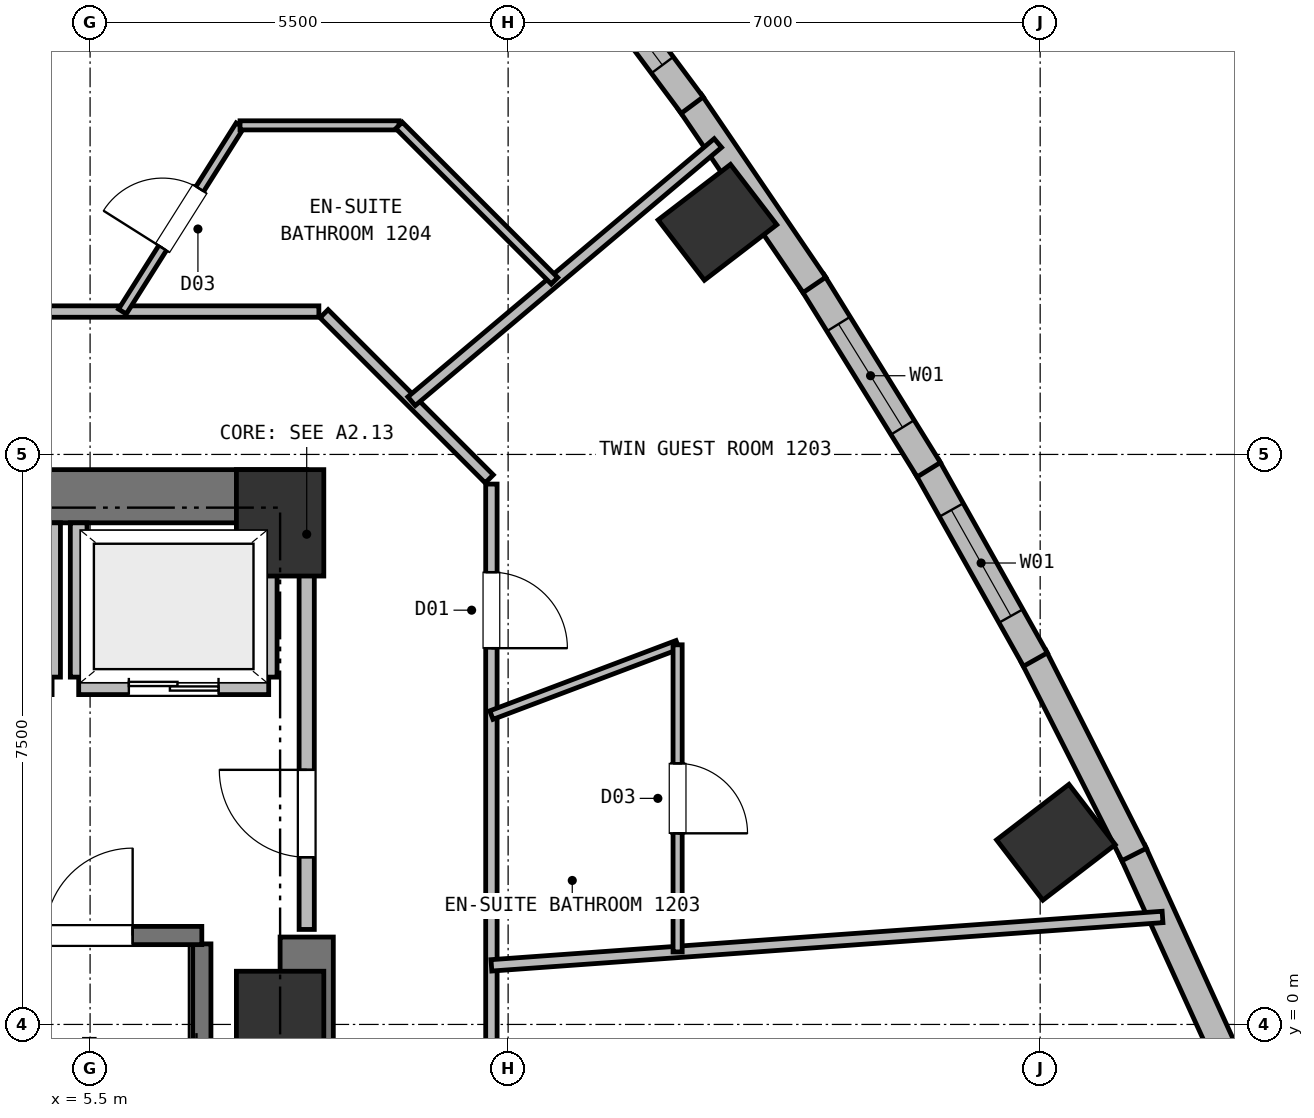
"""IFC4 building model, lengths in metres.
Left out: names, types, materials, properties, quantities, classifications, styles, units other than length and angle.
Written with IfcOpenShell. Run it as: python <this file> out.ifc"""

import sys

from ifc_helpers import new_model, si_unit, direction, frame, frame_2d, origin, origin_2d, place, context, subcontext, project, spatial, rectangle, extrude, element, fill, save


model = new_model("IFC4")
c1 = context("Model", 3, precision=1e-05, world=origin(), true_north=direction((0.0, 1.0)))
c2 = subcontext(c1, "Body", "Model", "MODEL_VIEW")
j1 = project(units=[si_unit("LENGTHUNIT", "METRE"), si_unit("PLANEANGLEUNIT", "RADIAN")], contexts=[c1])
p1 = place(None, origin())
s1 = spatial("IfcSite", under=j1, at=p1, CompositionType="ELEMENT")
p2 = place(p1, origin())
s2 = spatial("IfcBuilding", under=s1, at=p2, CompositionType="ELEMENT")
p3 = place(p2, frame((0.0, 0.0, 41.75)))
s3 = spatial("IfcBuildingStorey", under=s2, at=p3, CompositionType="ELEMENT", Elevation=41.75)
for number, where, z_axis, x_axis in (
    (1, (8.0, 0.0, 0.0), (0.0, 0.0, 1.0), (1.0, 0.0, 0.0)),
    (2, (8.0, 6.6, 0.0), (0.0, 0.0, 1.0), (1.0, 0.0, 0.0)),
):
    element("IfcColumn", number, at=place(p3, frame(where, z_axis=z_axis, x_axis=x_axis)), inside=s3, PredefinedType="COLUMN", context=c2, shape_type="SweptSolid", body=[
        extrude(rectangle(XDim=1.15, YDim=1.4, at=origin_2d()), origin(), (0.0, 0.0, 1.0), 3.75),
    ])
p4 = place(p3, frame((-8.35, 6.95, 0.0), z_axis=(0.0, 0.0, 1.0), x_axis=(1.0, 0.0, 0.0)))
e3 = element("IfcWall", 3, at=p4, inside=s3, PredefinedType="SHEAR", context=c2, shape_type="SweptSolid", body=[
    extrude(rectangle(XDim=16.7, YDim=0.7, at=frame_2d((8.35, 0.0))), origin(), (0.0, 0.0, 1.0), 3.5),
])
p5 = place(p3, frame((8.35, -6.95, 0.0), z_axis=(0.0, 0.0, 1.0), x_axis=(0.0, 1.0, 0.0)))
e4 = element("IfcWall", 4, at=p5, inside=s3, PredefinedType="SHEAR", context=c2, shape_type="SweptSolid", body=[
    extrude(rectangle(XDim=8.1, YDim=0.7, at=frame_2d((4.05, 0.0))), origin(), (0.0, 0.0, 1.0), 3.5),
])
for number, where, z_axis, x_axis in (
    (5, (18.207, 2.397, 0.0), (0.0, 0.0, 1.0), (-0.609, 0.793, 0.0)),
    (6, (13.754, 10.554, 0.0), (0.0, 0.0, 1.0), (-0.609, 0.793, 0.0)),
):
    element("IfcColumn", number, at=place(p3, frame(where, z_axis=z_axis, x_axis=x_axis)), inside=s3, PredefinedType="COLUMN", context=c2, shape_type="SweptSolid", body=[
        extrude(rectangle(XDim=1.0, YDim=1.2, at=origin_2d()), origin(), (0.0, 0.0, 1.0), 3.75),
    ])
p6 = place(p3, frame((19.215, 2.281, 0.0), z_axis=(0.0, 0.0, 1.0), x_axis=(0.414578361646, -0.910013616412, 0.0)))
e7 = element("IfcWall", 7, at=p6, inside=s3, PredefinedType="SOLIDWALL", context=c2, shape_type="SweptSolid", body=[
    extrude(rectangle(XDim=2.941, YDim=0.36, at=frame_2d((1.47, 0.0))), origin(), (0.0, 0.0, 1.0), 3.5),
])
p7 = place(p3, frame((17.914, 4.845, 0.0), z_axis=(0.0, 0.0, 1.0), x_axis=(0.452380947907, -0.891824802285, 0.0)))
e8 = element("IfcWall", 8, at=p7, inside=s3, PredefinedType="SOLIDWALL", context=c2, shape_type="SweptSolid", body=[
    extrude(rectangle(XDim=2.925, YDim=0.36, at=frame_2d((1.462, 0.0))), origin(), (0.0, 0.0, 1.0), 3.5),
])
p8 = place(p3, frame((16.509, 7.342, 0.0), z_axis=(0.0, 0.0, 1.0), x_axis=(0.489847587765, -0.871808087116, 0.0)))
e9 = element("IfcWall", 9, at=p8, inside=s3, PredefinedType="SOLIDWALL", context=c2, shape_type="SweptSolid", body=[
    extrude(rectangle(XDim=2.915, YDim=0.36, at=frame_2d((1.457, 0.0))), origin(), (0.0, 0.0, 1.0), 3.5),
])
p9 = place(p8, frame((0.657, 0.0, 0.72)))
e10 = element("IfcOpeningElement", 10, at=p9, cuts=e9, PredefinedType="OPENING", context=c2, shape_type="SweptSolid", body=[
    extrude(rectangle(XDim=1.6, YDim=1.88, at=frame_2d((0.8, 0.94))), frame((0.0, 0.19, 0.0), z_axis=(0.0, -1.0, 0.0), x_axis=(1.0, 0.0, 0.0)), (0.0, 0.0, 1.0), 0.38),
])
p10 = place(p3, frame((15.002, 9.772, 0.0), z_axis=(0.0, 0.0, 1.0), x_axis=(0.526646311391, -0.850084503269, 0.0)))
e11 = element("IfcWall", 11, at=p10, inside=s3, PredefinedType="SOLIDWALL", context=c2, shape_type="SweptSolid", body=[
    extrude(rectangle(XDim=2.91, YDim=0.36, at=frame_2d((1.455, 0.0))), origin(), (0.0, 0.0, 1.0), 3.5),
])
p11 = place(p10, frame((0.655, 0.0, 0.72)))
e12 = element("IfcOpeningElement", 12, at=p11, cuts=e11, PredefinedType="OPENING", context=c2, shape_type="SweptSolid", body=[
    extrude(rectangle(XDim=1.6, YDim=1.88, at=frame_2d((0.8, 0.94))), frame((0.0, 0.19, 0.0), z_axis=(0.0, -1.0, 0.0), x_axis=(1.0, 0.0, 0.0)), (0.0, 0.0, 1.0), 0.38),
])
p12 = place(p3, frame((13.393, 12.136, 0.0), z_axis=(0.0, 0.0, 1.0), x_axis=(0.562401815537, -0.82686407461, 0.0)))
e13 = element("IfcWall", 13, at=p12, inside=s3, PredefinedType="SOLIDWALL", context=c2, shape_type="SweptSolid", body=[
    extrude(rectangle(XDim=2.91, YDim=0.36, at=frame_2d((1.455, 0.0))), origin(), (0.0, 0.0, 1.0), 3.5),
])
p13 = place(p3, frame((11.681, 14.434, 0.0), z_axis=(0.0, 0.0, 1.0), x_axis=(0.597208824727, -0.802085793209, 0.0)))
e14 = element("IfcWall", 14, at=p13, inside=s3, PredefinedType="SOLIDWALL", context=c2, shape_type="SweptSolid", body=[
    extrude(rectangle(XDim=2.915, YDim=0.36, at=frame_2d((1.458, 0.0))), origin(), (0.0, 0.0, 1.0), 3.5),
])
p14 = place(p13, frame((0.657, 0.0, 0.72)))
e15 = element("IfcOpeningElement", 15, at=p14, cuts=e14, PredefinedType="OPENING", context=c2, shape_type="SweptSolid", body=[
    extrude(rectangle(XDim=1.6, YDim=1.88, at=frame_2d((0.8, 0.94))), frame((0.0, 0.19, 0.0), z_axis=(0.0, -1.0, 0.0), x_axis=(1.0, 0.0, 0.0)), (0.0, 0.0, 1.0), 0.38),
])
p15 = place(p3, frame((6.97, -6.16, 0.0), z_axis=(0.0, 0.0, 1.0), x_axis=(0.0, 1.0, 0.0)))
e16 = element("IfcWall", 16, at=p15, inside=s3, PredefinedType="SHEAR", context=c2, shape_type="SweptSolid", body=[
    extrude(rectangle(XDim=7.22, YDim=0.24, at=frame_2d((3.61, 0.0))), origin(), (0.0, 0.0, 1.0), 3.5),
])
p16 = place(p3, frame((4.01, 1.17, 0.0), z_axis=(0.0, 0.0, 1.0), x_axis=(1.0, 0.0, 0.0)))
e17 = element("IfcWall", 17, at=p16, inside=s3, PredefinedType="SHEAR", context=c2, shape_type="SweptSolid", body=[
    extrude(rectangle(XDim=2.96, YDim=0.24, at=frame_2d((1.48, 0.0))), origin(), (0.0, 0.0, 1.0), 3.5),
])
p17 = place(p16, frame((0.9, 0.0, 0.0)))
e18 = element("IfcOpeningElement", 18, at=p17, cuts=e17, PredefinedType="OPENING", context=c2, shape_type="SweptSolid", body=[
    extrude(rectangle(XDim=1.15, YDim=2.15, at=frame_2d((0.575, 1.075))), frame((0.0, 0.13, 0.0), z_axis=(0.0, -1.0, 0.0), x_axis=(1.0, 0.0, 0.0)), (0.0, 0.0, 1.0), 0.26),
])
p18 = place(p3, frame((5.35, 4.45, 0.0), z_axis=(0.0, 0.0, 1.0), x_axis=(1.0, 0.0, 0.0)))
e19 = element("IfcWall", 19, at=p18, inside=s3, PredefinedType="PARTITIONING", context=c2, shape_type="SweptSolid", body=[
    extrude(rectangle(XDim=2.5, YDim=0.22, at=frame_2d((1.25, 0.0))), origin(), (0.0, 0.0, 1.0), 3.5),
])
p19 = place(p18, frame((0.66, 0.0, 0.0)))
e20 = element("IfcOpeningElement", 20, at=p19, cuts=e19, PredefinedType="OPENING", context=c2, shape_type="SweptSolid", body=[
    extrude(rectangle(XDim=1.18, YDim=2.15, at=frame_2d((0.59, 1.075))), frame((0.0, 0.12, 0.0), z_axis=(0.0, -1.0, 0.0), x_axis=(1.0, 0.0, 0.0)), (0.0, 0.0, 1.0), 0.24),
])
p20 = place(p3, frame((5.35, 4.57, 0.0), z_axis=(0.0, 0.0, 1.0), x_axis=(0.0, 1.0, 0.0)))
e21 = element("IfcWall", 21, at=p20, inside=s3, PredefinedType="PARTITIONING", context=c2, shape_type="SweptSolid", body=[
    extrude(rectangle(XDim=2.03, YDim=0.22, at=frame_2d((1.015, 0.0))), origin(), (0.0, 0.0, 1.0), 3.5),
])
p21 = place(p3, frame((7.85, 4.57, 0.0), z_axis=(0.0, 0.0, 1.0), x_axis=(0.0, 1.0, 0.0)))
e22 = element("IfcWall", 22, at=p21, inside=s3, PredefinedType="PARTITIONING", context=c2, shape_type="SweptSolid", body=[
    extrude(rectangle(XDim=2.03, YDim=0.22, at=frame_2d((1.015, 0.0))), origin(), (0.0, 0.0, 1.0), 3.08),
])
p22 = place(p3, frame((2.6, 4.45, 0.0), z_axis=(0.0, 0.0, 1.0), x_axis=(1.0, 0.0, 0.0)))
e23 = element("IfcWall", 23, at=p22, inside=s3, PredefinedType="PARTITIONING", context=c2, shape_type="SweptSolid", body=[
    extrude(rectangle(XDim=2.4, YDim=0.22, at=frame_2d((1.2, 0.0))), origin(), (0.0, 0.0, 1.0), 3.5),
])
p23 = place(p22, frame((0.9, 0.0, 0.0)))
e24 = element("IfcOpeningElement", 24, at=p23, cuts=e23, PredefinedType="OPENING", context=c2, shape_type="SweptSolid", body=[
    extrude(rectangle(XDim=1.22, YDim=2.15, at=frame_2d((0.61, 1.075))), frame((0.0, 0.12, 0.0), z_axis=(0.0, -1.0, 0.0), x_axis=(1.0, 0.0, 0.0)), (0.0, 0.0, 1.0), 0.24),
])
p24 = place(p3, frame((5.0, 4.57, 0.0), z_axis=(0.0, 0.0, 1.0), x_axis=(0.0, 1.0, 0.0)))
e25 = element("IfcWall", 25, at=p24, inside=s3, PredefinedType="PARTITIONING", context=c2, shape_type="SweptSolid", body=[
    extrude(rectangle(XDim=2.03, YDim=0.22, at=frame_2d((1.015, 0.0))), origin(), (0.0, 0.0, 1.0), 3.5),
])
p25 = place(p3, frame((8.35, 1.25, 0.0), z_axis=(0.0, 0.0, 1.0), x_axis=(0.0, 1.0, 0.0)))
e26 = element("IfcWall", 26, at=p25, inside=s3, PredefinedType="PARTITIONING", context=c2, shape_type="SweptSolid", body=[
    extrude(rectangle(XDim=5.3, YDim=0.2, at=frame_2d((2.65, 0.0))), origin(), (0.0, 0.0, 1.0), 3.5),
])
p26 = place(p25, frame((0.95, 0.0, 0.0)))
e27 = element("IfcOpeningElement", 27, at=p26, cuts=e26, PredefinedType="OPENING", context=c2, shape_type="SweptSolid", body=[
    extrude(rectangle(XDim=1.15, YDim=2.15, at=frame_2d((0.575, 1.075))), frame((0.0, 0.11, 0.0), z_axis=(0.0, -1.0, 0.0), x_axis=(1.0, 0.0, 0.0)), (0.0, 0.0, 1.0), 0.22),
])
p27 = place(p3, frame((10.78, 7.11, 0.0), z_axis=(0.0, 0.0, 1.0), x_axis=(0.0, -1.0, 0.0)))
e28 = element("IfcWall", 28, at=p27, inside=s3, PredefinedType="PARTITIONING", context=c2, shape_type="SweptSolid", body=[
    extrude(rectangle(XDim=14.22, YDim=0.15, at=frame_2d((7.11, 0.0))), origin(), (0.0, 0.0, 1.0), 3.12),
])
p28 = place(p27, frame((1.159, 0.0, 0.0)))
e29 = element("IfcOpeningElement", 29, at=p28, cuts=e28, PredefinedType="OPENING", context=c2, shape_type="SweptSolid", body=[
    extrude(rectangle(XDim=1.0, YDim=2.15, at=frame_2d((0.5, 1.075))), frame((0.0, 0.085, 0.0), z_axis=(0.0, -1.0, 0.0), x_axis=(1.0, 0.0, 0.0)), (0.0, 0.0, 1.0), 0.17),
])
p29 = place(p27, frame((9.046, 0.0, 0.0)))
e30 = element("IfcOpeningElement", 30, at=p29, cuts=e28, PredefinedType="OPENING", context=c2, shape_type="SweptSolid", body=[
    extrude(rectangle(XDim=1.0, YDim=2.15, at=frame_2d((0.5, 1.075))), frame((0.0, 0.085, 0.0), z_axis=(0.0, -1.0, 0.0), x_axis=(1.0, 0.0, 0.0)), (0.0, 0.0, 1.0), 0.17),
])
p30 = place(p3, frame((8.578, 9.352, 0.0), z_axis=(0.0, 0.0, 1.0), x_axis=(0.707067066127, -0.707146494016, 0.0)))
e31 = element("IfcWall", 31, at=p30, inside=s3, PredefinedType="PARTITIONING", context=c2, shape_type="SweptSolid", body=[
    extrude(rectangle(XDim=3.074, YDim=0.15, at=frame_2d((1.537, 0.0))), origin(), (0.0, 0.0, 1.0), 3.5),
])
p31 = place(p3, frame((-8.51, 9.38, 0.0), z_axis=(0.0, 0.0, 1.0), x_axis=(1.0, 0.0, 0.0)))
e32 = element("IfcWall", 32, at=p31, inside=s3, PredefinedType="PARTITIONING", context=c2, shape_type="SweptSolid", body=[
    extrude(rectangle(XDim=17.02, YDim=0.15, at=frame_2d((8.51, 0.0))), origin(), (0.0, 0.0, 1.0), 3.5),
])
p32 = place(p31, frame((11.971, 0.0, 0.0)))
e33 = element("IfcOpeningElement", 33, at=p32, cuts=e32, PredefinedType="OPENING", context=c2, shape_type="SweptSolid", body=[
    extrude(rectangle(XDim=1.06, YDim=2.15, at=frame_2d((0.53, 1.075))), frame((0.0, 0.085, 0.0), z_axis=(0.0, -1.0, 0.0), x_axis=(1.0, 0.0, 0.0)), (0.0, 0.0, 1.0), 0.17),
])
p33 = place(p31, frame((5.492, 0.0, 0.0)))
e34 = element("IfcOpeningElement", 34, at=p33, cuts=e32, PredefinedType="OPENING", context=c2, shape_type="SweptSolid", body=[
    extrude(rectangle(XDim=1.06, YDim=2.15, at=frame_2d((0.53, 1.075))), frame((0.0, 0.085, 0.0), z_axis=(0.0, -1.0, 0.0), x_axis=(1.0, 0.0, 0.0)), (0.0, 0.0, 1.0), 0.17),
])
p34 = place(p3, frame((10.78, 0.777, 0.0), z_axis=(0.0, 0.0, 1.0), x_axis=(0.997408338359, 0.071948638431, 0.0)))
e35 = element("IfcWall", 35, at=p34, inside=s3, PredefinedType="PARTITIONING", context=c2, shape_type="SweptSolid", body=[
    extrude(rectangle(XDim=8.853, YDim=0.15, at=frame_2d((4.427, 0.0))), origin(), (0.0, 0.0, 1.0), 2.93),
])
p35 = place(p3, frame((10.78, 4.07, 0.0), z_axis=(0.0, 0.0, 1.0), x_axis=(0.935564526292, 0.353155797269, 0.0)))
e36 = element("IfcWall", 36, at=p35, inside=s3, PredefinedType="PARTITIONING", context=c2, shape_type="SweptSolid", body=[
    extrude(rectangle(XDim=2.619, YDim=0.12, at=frame_2d((1.309, 0.0))), origin(), (0.0, 0.0, 1.0), 3.5),
])
p36 = place(p3, frame((13.23, 4.995, 0.0), z_axis=(0.0, 0.0, 1.0), x_axis=(0.0, -1.0, 0.0)))
e37 = element("IfcWall", 37, at=p36, inside=s3, PredefinedType="PARTITIONING", context=c2, shape_type="SweptSolid", body=[
    extrude(rectangle(XDim=4.041, YDim=0.12, at=frame_2d((2.021, 0.0))), origin(), (0.0, 0.0, 1.0), 3.5),
])
p37 = place(p36, frame((1.561, 0.0, 0.0)))
e38 = element("IfcOpeningElement", 38, at=p37, cuts=e37, PredefinedType="OPENING", context=c2, shape_type="SweptSolid", body=[
    extrude(rectangle(XDim=0.92, YDim=2.1, at=frame_2d((0.46, 1.05))), frame((0.0, 0.07, 0.0), z_axis=(0.0, -1.0, 0.0), x_axis=(1.0, 0.0, 0.0)), (0.0, 0.0, 1.0), 0.14),
])
p38 = place(p3, frame((9.729, 8.2, 0.0), z_axis=(0.0, 0.0, 1.0), x_axis=(0.764648079626, 0.644448069532, 0.0)))
e39 = element("IfcWall", 39, at=p38, inside=s3, PredefinedType="PARTITIONING", context=c2, shape_type="SweptSolid", body=[
    extrude(rectangle(XDim=5.271, YDim=0.15, at=frame_2d((2.635, 0.0))), origin(), (0.0, 0.0, 1.0), 3.5),
])
p39 = place(p3, frame((5.925, 9.38, 0.0), z_axis=(0.0, 0.0, 1.0), x_axis=(0.534021517206, 0.845470886052, 0.0)))
e40 = element("IfcWall", 40, at=p39, inside=s3, PredefinedType="PARTITIONING", context=c2, shape_type="SweptSolid", body=[
    extrude(rectangle(XDim=2.898, YDim=0.12, at=frame_2d((1.449, 0.0))), origin(), (0.0, 0.0, 1.0), 3.5),
])
p40 = place(p39, frame((0.989, 0.0, 0.0)))
e41 = element("IfcOpeningElement", 41, at=p40, cuts=e40, PredefinedType="OPENING", context=c2, shape_type="SweptSolid", body=[
    extrude(rectangle(XDim=0.92, YDim=2.1, at=frame_2d((0.46, 1.05))), frame((0.0, 0.07, 0.0), z_axis=(0.0, -1.0, 0.0), x_axis=(1.0, 0.0, 0.0)), (0.0, 0.0, 1.0), 0.14),
])
p41 = place(p3, frame((7.473, 11.83, 0.0), z_axis=(0.0, 0.0, 1.0), x_axis=(1.0, 0.0, 0.0)))
e42 = element("IfcWall", 42, at=p41, inside=s3, PredefinedType="PARTITIONING", context=c2, shape_type="SweptSolid", body=[
    extrude(rectangle(XDim=2.092, YDim=0.12, at=frame_2d((1.046, 0.0))), origin(), (0.0, 0.0, 1.0), 3.5),
])
p42 = place(p3, frame((11.61, 9.785, 0.0), z_axis=(0.0, 0.0, 1.0), x_axis=(-0.707106781187, 0.707106781187, 0.0)))
e43 = element("IfcWall", 43, at=p42, inside=s3, PredefinedType="PARTITIONING", context=c2, shape_type="SweptSolid", body=[
    extrude(rectangle(XDim=2.892, YDim=0.12, at=frame_2d((1.446, 0.0))), origin(), (0.0, 0.0, 1.0), 3.5),
])
p43 = place(p9, origin())
e44 = element("IfcWindow", 44, at=p43, inside=s3, PartitioningType="SINGLE_PANEL", PredefinedType="WINDOW", context=c2, shape_type="SweptSolid", body=[
    extrude(rectangle(XDim=1.6, YDim=1.88, at=frame_2d((0.8, 0.94))), frame((0.0, 0.03, 0.0), z_axis=(0.0, -1.0, 0.0), x_axis=(1.0, 0.0, 0.0)), (0.0, 0.0, 1.0), 0.06),
])
fill(e10, e44)
p44 = place(p11, origin())
e45 = element("IfcWindow", 45, at=p44, inside=s3, PartitioningType="SINGLE_PANEL", PredefinedType="WINDOW", context=c2, shape_type="SweptSolid", body=[
    extrude(rectangle(XDim=1.6, YDim=1.88, at=frame_2d((0.8, 0.94))), frame((0.0, 0.03, 0.0), z_axis=(0.0, -1.0, 0.0), x_axis=(1.0, 0.0, 0.0)), (0.0, 0.0, 1.0), 0.06),
])
fill(e12, e45)
p45 = place(p14, origin())
e46 = element("IfcWindow", 46, at=p45, inside=s3, PartitioningType="SINGLE_PANEL", PredefinedType="WINDOW", context=c2, shape_type="SweptSolid", body=[
    extrude(rectangle(XDim=1.6, YDim=1.88, at=frame_2d((0.8, 0.94))), frame((0.0, 0.03, 0.0), z_axis=(0.0, -1.0, 0.0), x_axis=(1.0, 0.0, 0.0)), (0.0, 0.0, 1.0), 0.06),
])
fill(e15, e46)
p46 = place(p17, origin())
e47 = element("IfcDoor", 47, at=p46, inside=s3, OperationType="SINGLE_SWING_RIGHT", PredefinedType="DOOR", context=c2, shape_type="SweptSolid", body=[
    extrude(rectangle(XDim=1.15, YDim=2.15, at=frame_2d((0.575, 1.075))), frame((0.0, 0.025, 0.0), z_axis=(0.0, -1.0, 0.0), x_axis=(1.0, 0.0, 0.0)), (0.0, 0.0, 1.0), 0.05),
])
fill(e18, e47)
p47 = place(p19, origin())
e48 = element("IfcDoor", 48, at=p47, inside=s3, OperationType="DOUBLE_DOOR_SLIDING", PredefinedType="DOOR", context=c2, shape_type="SweptSolid", body=[
    extrude(rectangle(XDim=1.18, YDim=2.15, at=frame_2d((0.59, 1.075))), frame((0.0, 0.025, 0.0), z_axis=(0.0, -1.0, 0.0), x_axis=(1.0, 0.0, 0.0)), (0.0, 0.0, 1.0), 0.05),
])
fill(e20, e48)
p48 = place(p26, origin())
e49 = element("IfcDoor", 49, at=p48, inside=s3, OperationType="SINGLE_SWING_RIGHT", PredefinedType="DOOR", context=c2, shape_type="SweptSolid", body=[
    extrude(rectangle(XDim=1.15, YDim=2.15, at=frame_2d((0.575, 1.075))), frame((0.0, 0.025, 0.0), z_axis=(0.0, -1.0, 0.0), x_axis=(1.0, 0.0, 0.0)), (0.0, 0.0, 1.0), 0.05),
])
fill(e27, e49)
p49 = place(p37, origin())
e50 = element("IfcDoor", 50, at=p49, inside=s3, OperationType="SINGLE_SWING_RIGHT", PredefinedType="DOOR", context=c2, shape_type="SweptSolid", body=[
    extrude(rectangle(XDim=0.92, YDim=2.1, at=frame_2d((0.46, 1.05))), frame((0.0, 0.025, 0.0), z_axis=(0.0, -1.0, 0.0), x_axis=(1.0, 0.0, 0.0)), (0.0, 0.0, 1.0), 0.05),
])
fill(e38, e50)
p50 = place(p40, origin())
e51 = element("IfcDoor", 51, at=p50, inside=s3, OperationType="SINGLE_SWING_LEFT", PredefinedType="DOOR", context=c2, shape_type="SweptSolid", body=[
    extrude(rectangle(XDim=0.92, YDim=2.1, at=frame_2d((0.46, 1.05))), frame((0.0, 0.025, 0.0), z_axis=(0.0, -1.0, 0.0), x_axis=(1.0, 0.0, 0.0)), (0.0, 0.0, 1.0), 0.05),
])
fill(e41, e51)
p51 = place(p28, origin())
e52 = element("IfcDoor", 52, at=p51, inside=s3, OperationType="SINGLE_SWING_RIGHT", PredefinedType="DOOR", context=c2, shape_type="SweptSolid", body=[
    extrude(rectangle(XDim=1.0, YDim=2.15, at=frame_2d((0.5, 1.075))), frame((0.0, 0.025, 0.0), z_axis=(0.0, -1.0, 0.0), x_axis=(1.0, 0.0, 0.0)), (0.0, 0.0, 1.0), 0.05),
])
fill(e29, e52)
save(model, sys.argv[1])
